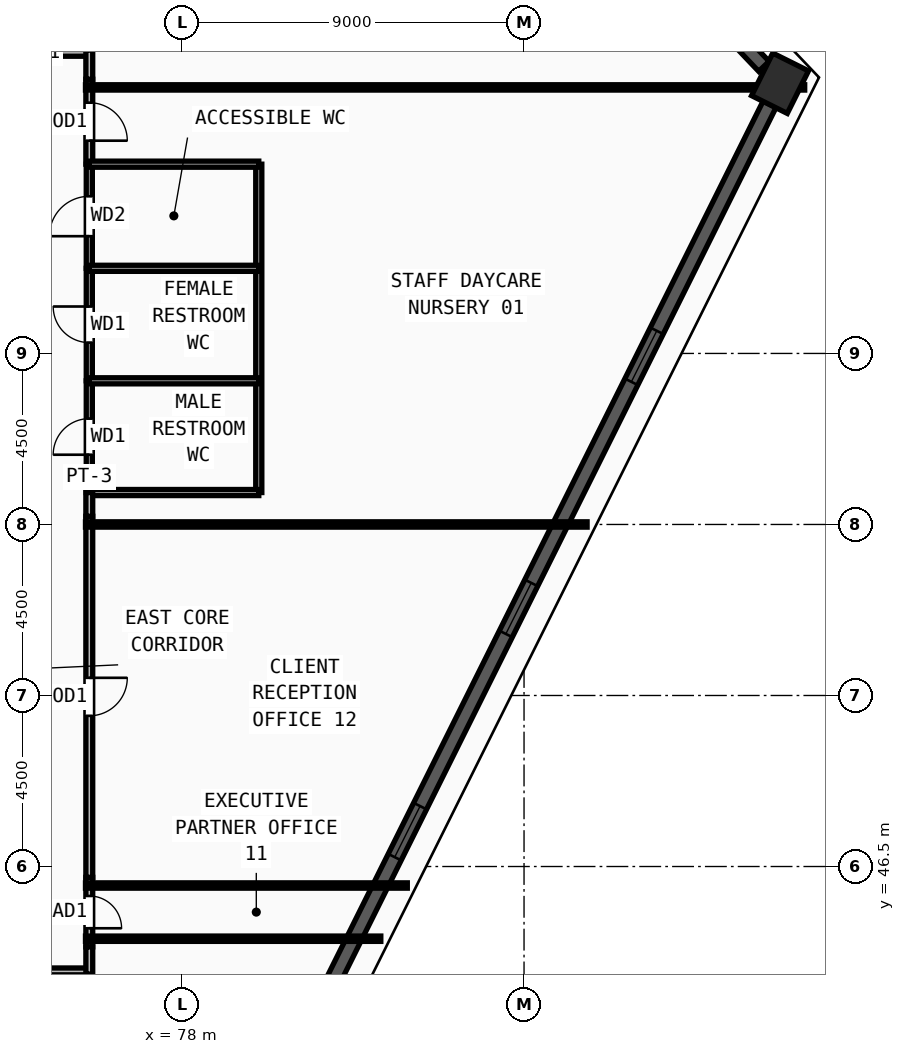
"""IFC4 building model, lengths in metres.
Left out: names, types, materials, properties, quantities, classifications, styles, units other than length and angle.
Written with IfcOpenShell. Run it as: python <this file> out.ifc"""

import sys

from ifc_helpers import new_model, si_unit, direction, frame, frame_2d, origin, origin_2d, place, context, subcontext, project, spatial, rectangle, extrude, source, transform, mapped, element, fill, save


model = new_model("IFC4")
c1 = context("Model", 3, precision=1e-05, world=origin(), true_north=direction((0.0, 1.0)))
c2 = subcontext(c1, "Body", "Model", "MODEL_VIEW")
j1 = project(units=[si_unit("LENGTHUNIT", "METRE"), si_unit("PLANEANGLEUNIT", "RADIAN")], contexts=[c1])
p1 = place(None, origin())
s1 = spatial("IfcSite", under=j1, at=p1, CompositionType="ELEMENT")
p2 = place(p1, origin())
s2 = spatial("IfcBuilding", under=s1, at=p2, CompositionType="ELEMENT")
p3 = place(p2, frame((0.0, 0.0, 201.75)))
s3 = spatial("IfcBuildingStorey", under=s2, at=p3, CompositionType="ELEMENT", Elevation=201.75)
m1 = source(origin(), c2, "Body", "SweptSolid", [
    extrude(rectangle(XDim=1.25, YDim=1.05, at=origin_2d()), origin(), (0.0, 0.0, 1.0), 3.75),
])
p4 = place(p3, frame((93.736, 67.109, 0.0), z_axis=(0.0, 0.0, 1.0), x_axis=(0.445729165431, 0.895167867544, 0.0)))
e1 = element("IfcColumn", 1, at=p4, inside=s3, PredefinedType="COLUMN", context=c2, shape_type="MappedRepresentation", body=[
    mapped(m1, transform((0.0, 0.0, 0.0), x_axis=(1.0, 0.0, 0.0), y_axis=(0.0, 1.0, 0.0), z_axis=(0.0, 0.0, 1.0), scale=1.0)),
])
p5 = place(p3, frame((80.249, 40.024, 0.0), z_axis=(0.0, 0.0, 1.0), x_axis=(0.445750225077, 0.895157381047, 0.0)))
e2 = element("IfcWall", 2, at=p5, inside=s3, PredefinedType="SOLIDWALL", context=c2, shape_type="SweptSolid", body=[
    extrude(rectangle(XDim=29.642, YDim=0.38, at=frame_2d((14.821, 0.0))), origin(), (0.0, 0.0, 1.0), 3.57),
])
m2 = source(origin(), c2, "Body", "SweptSolid", [
    extrude(rectangle(XDim=1.5, YDim=1.9, at=frame_2d((0.75, 0.95))), frame((0.0, 0.2, 0.0), z_axis=(0.0, -1.0, 0.0), x_axis=(1.0, 0.0, 0.0)), (0.0, 0.0, 1.0), 0.4),
])
p6 = place(p5, frame((7.51, 0.0, 0.55)))
e3 = element("IfcOpeningElement", 3, at=p6, cuts=e2, PredefinedType="OPENING", context=c2, shape_type="MappedRepresentation", body=[
    mapped(m2, transform((0.0, 0.0, 0.0), x_axis=(1.0, 0.0, 0.0), y_axis=(0.0, 1.0, 0.0), z_axis=(0.0, 0.0, 1.0), scale=1.0)),
])
p7 = place(p5, frame((14.071, 0.0, 0.55)))
e4 = element("IfcOpeningElement", 4, at=p7, cuts=e2, PredefinedType="OPENING", context=c2, shape_type="MappedRepresentation", body=[
    mapped(m2, transform((0.0, 0.0, 0.0), x_axis=(1.0, 0.0, 0.0), y_axis=(0.0, 1.0, 0.0), z_axis=(0.0, 0.0, 1.0), scale=1.0)),
])
p8 = place(p5, frame((21.481, 0.0, 0.55)))
e5 = element("IfcOpeningElement", 5, at=p8, cuts=e2, PredefinedType="OPENING", context=c2, shape_type="MappedRepresentation", body=[
    mapped(m2, transform((0.0, 0.0, 0.0), x_axis=(1.0, 0.0, 0.0), y_axis=(0.0, 1.0, 0.0), z_axis=(0.0, 0.0, 1.0), scale=1.0)),
])
p9 = place(p3, frame((93.312, 67.554, 0.0), z_axis=(0.0, 0.0, 1.0), x_axis=(-0.689339649611, 0.724438297906, 0.0)))
e6 = element("IfcWall", 6, at=p9, inside=s3, PredefinedType="SOLIDWALL", context=c2, shape_type="SweptSolid", body=[
    extrude(rectangle(XDim=4.445, YDim=0.38, at=frame_2d((2.222, 0.0))), origin(), (0.0, 0.0, 1.0), 3.57),
])
m3 = source(origin(), c2, "Body", "SweptSolid", [
    extrude(rectangle(XDim=1.2, YDim=1.9, at=frame_2d((0.6, 0.95))), frame((0.0, 0.2, 0.0), z_axis=(0.0, -1.0, 0.0), x_axis=(1.0, 0.0, 0.0)), (0.0, 0.0, 1.0), 0.4),
])
p10 = place(p9, frame((1.622, 0.0, 0.55)))
e7 = element("IfcOpeningElement", 7, at=p10, cuts=e6, PredefinedType="OPENING", context=c2, shape_type="MappedRepresentation", body=[
    mapped(m3, transform((0.0, 0.0, 0.0), x_axis=(1.0, 0.0, 0.0), y_axis=(0.0, 1.0, 0.0), z_axis=(0.0, 0.0, 1.0), scale=1.0)),
])
p11 = place(p3, frame((75.56, 56.34, 0.0), z_axis=(0.0, 0.0, 1.0), x_axis=(0.0, 1.0, 0.0)))
e8 = element("IfcWall", 8, at=p11, inside=s3, PredefinedType="PARTITIONING", context=c2, shape_type="SweptSolid", body=[
    extrude(rectangle(XDim=2.94, YDim=0.16, at=frame_2d((1.47, 0.0))), origin(), (0.0, 0.0, 1.0), 3.57),
])
m4 = source(origin(), c2, "Body", "SweptSolid", [
    extrude(rectangle(XDim=0.95, YDim=2.15, at=frame_2d((0.475, 1.075))), frame((0.0, 0.09, 0.0), z_axis=(0.0, -1.0, 0.0), x_axis=(1.0, 0.0, 0.0)), (0.0, 0.0, 1.0), 0.18),
])
p12 = place(p11, frame((0.995, 0.0, 0.0)))
e9 = element("IfcOpeningElement", 9, at=p12, cuts=e8, PredefinedType="OPENING", context=c2, shape_type="MappedRepresentation", body=[
    mapped(m4, transform((0.0, 0.0, 0.0), x_axis=(1.0, 0.0, 0.0), y_axis=(0.0, 1.0, 0.0), z_axis=(0.0, 0.0, 1.0), scale=1.0)),
])
p13 = place(p3, frame((75.56, 59.28, 0.0), z_axis=(0.0, 0.0, 1.0), x_axis=(0.0, 1.0, 0.0)))
e10 = element("IfcWall", 10, at=p13, inside=s3, PredefinedType="PARTITIONING", context=c2, shape_type="SweptSolid", body=[
    extrude(rectangle(XDim=2.96, YDim=0.16, at=frame_2d((1.48, 0.0))), origin(), (0.0, 0.0, 1.0), 3.57),
])
p14 = place(p13, frame((1.005, 0.0, 0.0)))
e11 = element("IfcOpeningElement", 11, at=p14, cuts=e10, PredefinedType="OPENING", context=c2, shape_type="MappedRepresentation", body=[
    mapped(m4, transform((0.0, 0.0, 0.0), x_axis=(1.0, 0.0, 0.0), y_axis=(0.0, 1.0, 0.0), z_axis=(0.0, 0.0, 1.0), scale=1.0)),
])
p15 = place(p3, frame((75.56, 62.24, 0.0), z_axis=(0.0, 0.0, 1.0), x_axis=(0.0, 1.0, 0.0)))
e12 = element("IfcWall", 12, at=p15, inside=s3, PredefinedType="PARTITIONING", context=c2, shape_type="SweptSolid", body=[
    extrude(rectangle(XDim=2.74, YDim=0.16, at=frame_2d((1.37, 0.0))), origin(), (0.0, 0.0, 1.0), 3.57),
])
m5 = source(origin(), c2, "Body", "SweptSolid", [
    extrude(rectangle(XDim=1.05, YDim=2.15, at=frame_2d((0.525, 1.075))), frame((0.0, 0.09, 0.0), z_axis=(0.0, -1.0, 0.0), x_axis=(1.0, 0.0, 0.0)), (0.0, 0.0, 1.0), 0.18),
])
p16 = place(p15, frame((0.845, 0.0, 0.0)))
e13 = element("IfcOpeningElement", 13, at=p16, cuts=e12, PredefinedType="OPENING", context=c2, shape_type="MappedRepresentation", body=[
    mapped(m5, transform((0.0, 0.0, 0.0), x_axis=(1.0, 0.0, 0.0), y_axis=(0.0, 1.0, 0.0), z_axis=(0.0, 0.0, 1.0), scale=1.0)),
])
p17 = place(p3, frame((75.56, 67.215, 0.0), z_axis=(0.0, 0.0, 1.0), x_axis=(0.0, -1.0, 0.0)))
e14 = element("IfcWall", 14, at=p17, inside=s3, PredefinedType="PARTITIONING", context=c2, shape_type="SweptSolid", body=[
    extrude(rectangle(XDim=2.235, YDim=0.18, at=frame_2d((1.118, 0.0))), origin(), (0.0, 0.0, 1.0), 3.57),
])
m6 = source(origin(), c2, "Body", "SweptSolid", [
    extrude(rectangle(XDim=1.0, YDim=2.2, at=frame_2d((0.5, 1.1))), frame((0.0, 0.1, 0.0), z_axis=(0.0, -1.0, 0.0), x_axis=(1.0, 0.0, 0.0)), (0.0, 0.0, 1.0), 0.2),
])
p18 = place(p17, frame((0.617, 0.0, 0.0)))
e15 = element("IfcOpeningElement", 15, at=p18, cuts=e14, PredefinedType="OPENING", context=c2, shape_type="MappedRepresentation", body=[
    mapped(m6, transform((0.0, 0.0, 0.0), x_axis=(1.0, 0.0, 0.0), y_axis=(0.0, 1.0, 0.0), z_axis=(0.0, 0.0, 1.0), scale=1.0)),
])
p19 = place(p3, frame((67.785, 67.91, 0.0), z_axis=(0.0, 0.0, 1.0), x_axis=(1.0, 0.0, 0.0)))
e16 = element("IfcWall", 16, at=p19, inside=s3, PredefinedType="PARTITIONING", context=c2, shape_type="SweptSolid", body=[
    extrude(rectangle(XDim=7.845, YDim=0.18, at=frame_2d((3.922, 0.0))), origin(), (0.0, 0.0, 1.0), 3.57),
])
m7 = source(origin(), c2, "Body", "SweptSolid", [
    extrude(rectangle(XDim=1.5, YDim=2.2, at=frame_2d((0.75, 1.1))), frame((0.0, 0.1, 0.0), z_axis=(0.0, -1.0, 0.0), x_axis=(1.0, 0.0, 0.0)), (0.0, 0.0, 1.0), 0.2),
])
p20 = place(p19, frame((3.172, 0.0, 0.0)))
e17 = element("IfcOpeningElement", 17, at=p20, cuts=e16, PredefinedType="OPENING", context=c2, shape_type="MappedRepresentation", body=[
    mapped(m7, transform((0.0, 0.0, 0.0), x_axis=(1.0, 0.0, 0.0), y_axis=(0.0, 1.0, 0.0), z_axis=(0.0, 0.0, 1.0), scale=1.0)),
])
p21 = place(p3, frame((75.63, 43.74, 0.0), z_axis=(0.0, 0.0, 1.0), x_axis=(-1.0, 0.0, 0.0)))
e18 = element("IfcWall", 18, at=p21, inside=s3, PredefinedType="PARTITIONING", context=c2, shape_type="SweptSolid", body=[
    extrude(rectangle(XDim=31.26, YDim=0.18, at=frame_2d((15.63, 0.0))), origin(), (0.0, 0.0, 1.0), 3.57),
])
p22 = place(p21, frame((10.38, 0.0, 0.0)))
e19 = element("IfcOpeningElement", 19, at=p22, cuts=e18, PredefinedType="OPENING", context=c2, shape_type="MappedRepresentation", body=[
    mapped(m7, transform((0.0, 0.0, 0.0), x_axis=(1.0, 0.0, 0.0), y_axis=(0.0, 1.0, 0.0), z_axis=(0.0, 0.0, 1.0), scale=1.0)),
])
p23 = place(p3, frame((75.56, 46.215, 0.0), z_axis=(0.0, 0.0, 1.0), x_axis=(0.0, -1.0, 0.0)))
e20 = element("IfcWall", 20, at=p23, inside=s3, PredefinedType="PARTITIONING", context=c2, shape_type="SweptSolid", body=[
    extrude(rectangle(XDim=1.83, YDim=0.18, at=frame_2d((0.915, 0.0))), origin(), (0.0, 0.0, 1.0), 3.57),
])
m8 = source(origin(), c2, "Body", "SweptSolid", [
    extrude(rectangle(XDim=0.85, YDim=2.1, at=frame_2d((0.425, 1.05))), frame((0.0, 0.1, 0.0), z_axis=(0.0, -1.0, 0.0), x_axis=(1.0, 0.0, 0.0)), (0.0, 0.0, 1.0), 0.2),
])
p24 = place(p23, frame((0.49, 0.0, 0.0)))
e21 = element("IfcOpeningElement", 21, at=p24, cuts=e20, PredefinedType="OPENING", context=c2, shape_type="MappedRepresentation", body=[
    mapped(m8, transform((0.0, 0.0, 0.0), x_axis=(1.0, 0.0, 0.0), y_axis=(0.0, 1.0, 0.0), z_axis=(0.0, 0.0, 1.0), scale=1.0)),
])
p25 = place(p3, frame((75.56, 55.715, 0.0), z_axis=(0.0, 0.0, 1.0), x_axis=(0.0, -1.0, 0.0)))
e22 = element("IfcWall", 22, at=p25, inside=s3, PredefinedType="PARTITIONING", context=c2, shape_type="SweptSolid", body=[
    extrude(rectangle(XDim=9.5, YDim=0.18, at=frame_2d((4.75, 0.0))), origin(), (0.0, 0.0, 1.0), 3.57),
])
p26 = place(p25, frame((4.25, 0.0, 0.0)))
e23 = element("IfcOpeningElement", 23, at=p26, cuts=e22, PredefinedType="OPENING", context=c2, shape_type="MappedRepresentation", body=[
    mapped(m6, transform((0.0, 0.0, 0.0), x_axis=(1.0, 0.0, 0.0), y_axis=(0.0, 1.0, 0.0), z_axis=(0.0, 0.0, 1.0), scale=1.0)),
])
p27 = place(p3, frame((80.02, 56.34, 0.0), z_axis=(0.0, 0.0, 1.0), x_axis=(0.0, 1.0, 0.0)))
e24 = element("IfcWall", 24, at=p27, inside=s3, PredefinedType="PARTITIONING", context=c2, shape_type="SweptSolid", body=[
    extrude(rectangle(XDim=8.64, YDim=0.16, at=frame_2d((4.32, 0.0))), origin(), (0.0, 0.0, 1.0), 3.57),
])
for number, where, z_axis, x_axis in (
    (25, (75.56, 56.34, 0.0), (0.0, 0.0, 1.0), (1.0, 0.0, 0.0)),
    (26, (75.56, 59.28, 0.0), (0.0, 0.0, 1.0), (1.0, 0.0, 0.0)),
    (27, (75.56, 62.24, 0.0), (0.0, 0.0, 1.0), (1.0, 0.0, 0.0)),
    (28, (75.56, 64.98, 0.0), (0.0, 0.0, 1.0), (1.0, 0.0, 0.0)),
):
    element("IfcWall", number, at=place(p3, frame(where, z_axis=z_axis, x_axis=x_axis)), inside=s3, PredefinedType="PARTITIONING", context=c2, shape_type="SweptSolid", body=[
        extrude(rectangle(XDim=4.46, YDim=0.16, at=frame_2d((2.23, 0.0))), origin(), (0.0, 0.0, 1.0), 3.57),
    ])
p28 = place(p3, frame((75.56, 56.34, 0.0), z_axis=(0.0, 0.0, 1.0), x_axis=(0.0, -1.0, 0.0)))
e29 = element("IfcWall", 29, at=p28, inside=s3, PredefinedType="PARTITIONING", context=c2, shape_type="SweptSolid", body=[
    extrude(rectangle(XDim=0.625, YDim=0.18, at=frame_2d((0.312, 0.0))), origin(), (0.0, 0.0, 1.0), 3.57),
])
p29 = place(p3, frame((75.56, 67.98, 0.0), z_axis=(0.0, 0.0, 1.0), x_axis=(0.0, -1.0, 0.0)))
e30 = element("IfcWall", 30, at=p29, inside=s3, PredefinedType="PARTITIONING", context=c2, shape_type="SweptSolid", body=[
    extrude(rectangle(XDim=0.765, YDim=0.18, at=frame_2d((0.382, 0.0))), origin(), (0.0, 0.0, 1.0), 3.57),
])
p30 = place(p3, frame((75.56, 44.385, 0.0), z_axis=(0.0, 0.0, 1.0), x_axis=(0.0, -1.0, 0.0)))
e31 = element("IfcWall", 31, at=p30, inside=s3, PredefinedType="PARTITIONING", context=c2, shape_type="SweptSolid", body=[
    extrude(rectangle(XDim=0.715, YDim=0.18, at=frame_2d((0.357, 0.0))), origin(), (0.0, 0.0, 1.0), 3.57),
])
p31 = place(p3, frame((75.46, 44.6, 0.0), z_axis=(0.0, 0.0, 1.0), x_axis=(1.0, 0.0, 0.0)))
e32 = element("IfcWall", 32, at=p31, inside=s3, PredefinedType="PARTITIONING", context=c2, shape_type="SweptSolid", body=[
    extrude(rectangle(XDim=7.771, YDim=0.14, at=frame_2d((3.885, 0.0))), origin(), (0.0, 0.0, 1.0), 3.57),
])
p32 = place(p3, frame((75.46, 46.0, 0.0), z_axis=(0.0, 0.0, 1.0), x_axis=(1.0, 0.0, 0.0)))
e33 = element("IfcWall", 33, at=p32, inside=s3, PredefinedType="PARTITIONING", context=c2, shape_type="SweptSolid", body=[
    extrude(rectangle(XDim=8.468, YDim=0.14, at=frame_2d((4.234, 0.0))), origin(), (0.0, 0.0, 1.0), 3.57),
])
p33 = place(p3, frame((75.46, 55.5, 0.0), z_axis=(0.0, 0.0, 1.0), x_axis=(1.0, 0.0, 0.0)))
e34 = element("IfcWall", 34, at=p33, inside=s3, PredefinedType="PARTITIONING", context=c2, shape_type="SweptSolid", body=[
    extrude(rectangle(XDim=13.199, YDim=0.14, at=frame_2d((6.6, 0.0))), origin(), (0.0, 0.0, 1.0), 3.57),
])
p34 = place(p3, frame((75.46, 67.0, 0.0), z_axis=(0.0, 0.0, 1.0), x_axis=(1.0, 0.0, 0.0)))
e35 = element("IfcWall", 35, at=p34, inside=s3, PredefinedType="PARTITIONING", context=c2, shape_type="SweptSolid", body=[
    extrude(rectangle(XDim=18.925, YDim=0.14, at=frame_2d((9.462, 0.0))), origin(), (0.0, 0.0, 1.0), 2.855),
])
m9 = source(origin(), c2, "Body", "SweptSolid", [
    extrude(rectangle(XDim=1.5, YDim=1.9, at=frame_2d((0.75, 0.95))), frame((0.0, 0.03, 0.0), z_axis=(0.0, -1.0, 0.0), x_axis=(1.0, 0.0, 0.0)), (0.0, 0.0, 1.0), 0.06),
])
p35 = place(p6, origin())
e36 = element("IfcWindow", 36, at=p35, inside=s3, PartitioningType="DOUBLE_PANEL_VERTICAL", PredefinedType="WINDOW", context=c2, shape_type="MappedRepresentation", body=[
    mapped(m9, transform((0.0, 0.0, 0.0), x_axis=(1.0, 0.0, 0.0), y_axis=(0.0, 1.0, 0.0), z_axis=(0.0, 0.0, 1.0), scale=1.0)),
])
fill(e3, e36)
p36 = place(p7, origin())
e37 = element("IfcWindow", 37, at=p36, inside=s3, PartitioningType="DOUBLE_PANEL_VERTICAL", PredefinedType="WINDOW", context=c2, shape_type="MappedRepresentation", body=[
    mapped(m9, transform((0.0, 0.0, 0.0), x_axis=(1.0, 0.0, 0.0), y_axis=(0.0, 1.0, 0.0), z_axis=(0.0, 0.0, 1.0), scale=1.0)),
])
fill(e4, e37)
p37 = place(p8, origin())
e38 = element("IfcWindow", 38, at=p37, inside=s3, PartitioningType="DOUBLE_PANEL_VERTICAL", PredefinedType="WINDOW", context=c2, shape_type="MappedRepresentation", body=[
    mapped(m9, transform((0.0, 0.0, 0.0), x_axis=(1.0, 0.0, 0.0), y_axis=(0.0, 1.0, 0.0), z_axis=(0.0, 0.0, 1.0), scale=1.0)),
])
fill(e5, e38)
m10 = source(origin(), c2, "Body", "SweptSolid", [
    extrude(rectangle(XDim=0.95, YDim=2.15, at=frame_2d((0.475, 1.075))), frame((0.0, 0.025, 0.0), z_axis=(0.0, -1.0, 0.0), x_axis=(1.0, 0.0, 0.0)), (0.0, 0.0, 1.0), 0.05),
])
p38 = place(p12, origin())
e39 = element("IfcDoor", 39, at=p38, inside=s3, OperationType="SINGLE_SWING_LEFT", PredefinedType="DOOR", context=c2, shape_type="MappedRepresentation", body=[
    mapped(m10, transform((0.0, 0.0, 0.0), x_axis=(1.0, 0.0, 0.0), y_axis=(0.0, 1.0, 0.0), z_axis=(0.0, 0.0, 1.0), scale=1.0)),
])
fill(e9, e39)
p39 = place(p14, origin())
e40 = element("IfcDoor", 40, at=p39, inside=s3, OperationType="SINGLE_SWING_RIGHT", PredefinedType="DOOR", context=c2, shape_type="MappedRepresentation", body=[
    mapped(m10, transform((0.0, 0.0, 0.0), x_axis=(1.0, 0.0, 0.0), y_axis=(0.0, 1.0, 0.0), z_axis=(0.0, 0.0, 1.0), scale=1.0)),
])
fill(e11, e40)
m11 = source(origin(), c2, "Body", "SweptSolid", [
    extrude(rectangle(XDim=1.05, YDim=2.15, at=frame_2d((0.525, 1.075))), frame((0.0, 0.025, 0.0), z_axis=(0.0, -1.0, 0.0), x_axis=(1.0, 0.0, 0.0)), (0.0, 0.0, 1.0), 0.05),
])
p40 = place(p16, origin())
e41 = element("IfcDoor", 41, at=p40, inside=s3, OperationType="SINGLE_SWING_LEFT", PredefinedType="DOOR", context=c2, shape_type="MappedRepresentation", body=[
    mapped(m11, transform((0.0, 0.0, 0.0), x_axis=(1.0, 0.0, 0.0), y_axis=(0.0, 1.0, 0.0), z_axis=(0.0, 0.0, 1.0), scale=1.0)),
])
fill(e13, e41)
m12 = source(origin(), c2, "Body", "SweptSolid", [
    extrude(rectangle(XDim=1.0, YDim=2.2, at=frame_2d((0.5, 1.1))), frame((0.0, 0.025, 0.0), z_axis=(0.0, -1.0, 0.0), x_axis=(1.0, 0.0, 0.0)), (0.0, 0.0, 1.0), 0.05),
])
p41 = place(p18, origin())
e42 = element("IfcDoor", 42, at=p41, inside=s3, OperationType="SINGLE_SWING_RIGHT", PredefinedType="DOOR", context=c2, shape_type="MappedRepresentation", body=[
    mapped(m12, transform((0.0, 0.0, 0.0), x_axis=(1.0, 0.0, 0.0), y_axis=(0.0, 1.0, 0.0), z_axis=(0.0, 0.0, 1.0), scale=1.0)),
])
fill(e15, e42)
m13 = source(origin(), c2, "Body", "SweptSolid", [
    extrude(rectangle(XDim=0.85, YDim=2.1, at=frame_2d((0.425, 1.05))), frame((0.0, 0.025, 0.0), z_axis=(0.0, -1.0, 0.0), x_axis=(1.0, 0.0, 0.0)), (0.0, 0.0, 1.0), 0.05),
])
p42 = place(p24, origin())
e43 = element("IfcDoor", 43, at=p42, inside=s3, OperationType="SINGLE_SWING_RIGHT", PredefinedType="DOOR", context=c2, shape_type="MappedRepresentation", body=[
    mapped(m13, transform((0.0, 0.0, 0.0), x_axis=(1.0, 0.0, 0.0), y_axis=(0.0, 1.0, 0.0), z_axis=(0.0, 0.0, 1.0), scale=1.0)),
])
fill(e21, e43)
p43 = place(p26, origin())
e44 = element("IfcDoor", 44, at=p43, inside=s3, OperationType="SINGLE_SWING_LEFT", PredefinedType="DOOR", context=c2, shape_type="MappedRepresentation", body=[
    mapped(m12, transform((0.0, 0.0, 0.0), x_axis=(1.0, 0.0, 0.0), y_axis=(0.0, 1.0, 0.0), z_axis=(0.0, 0.0, 1.0), scale=1.0)),
])
fill(e23, e44)
save(model, sys.argv[1])
